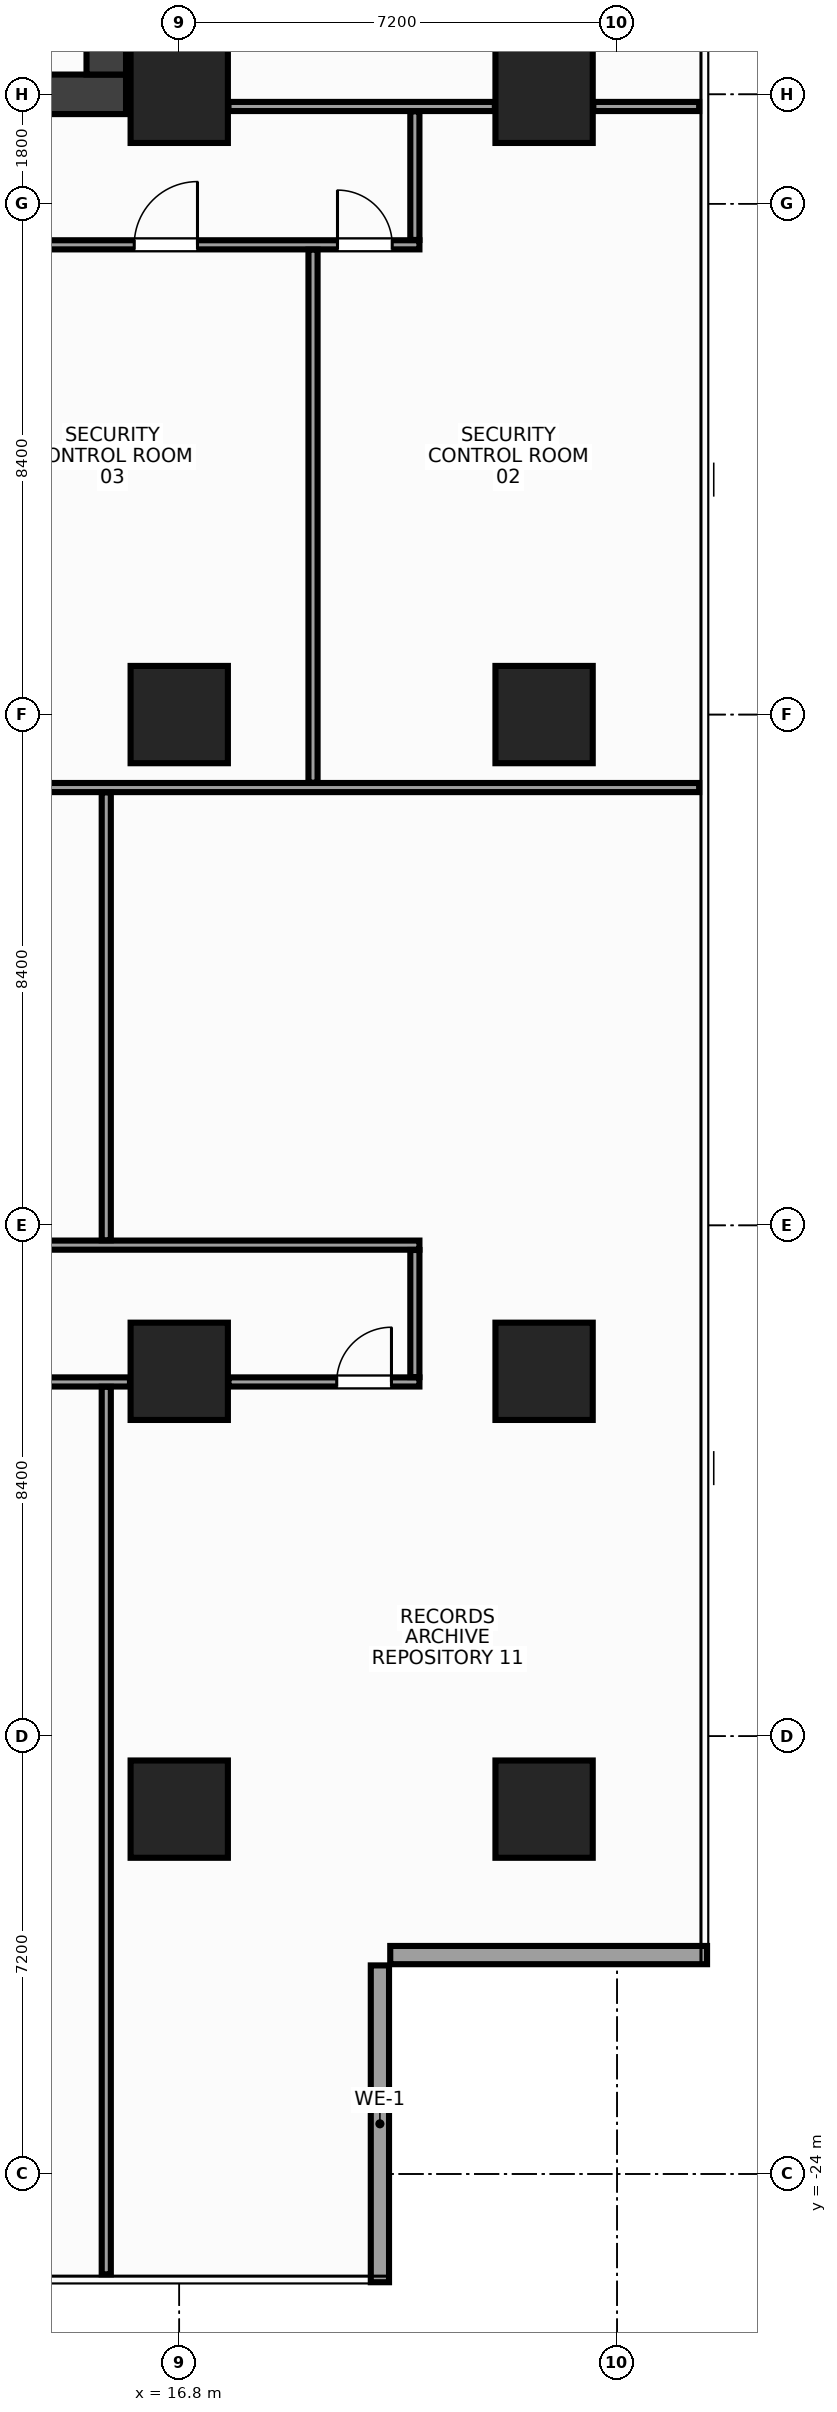
"""IFC4 building model, lengths in metres.
Left out: names, types, materials, properties, quantities, classifications, styles, units other than length and angle.
Written with IfcOpenShell. Run it as: python <this file> out.ifc"""

import sys

from ifc_helpers import new_model, si_unit, direction, frame, frame_2d, origin, origin_2d, place, context, subcontext, project, spatial, rectangle, extrude, source, transform, mapped, element, fill, save


model = new_model("IFC4")
c1 = context("Model", 3, precision=1e-05, world=origin(), true_north=direction((0.0, 1.0)))
c2 = subcontext(c1, "Body", "Model", "MODEL_VIEW")
j1 = project(units=[si_unit("LENGTHUNIT", "METRE"), si_unit("PLANEANGLEUNIT", "RADIAN")], contexts=[c1])
p1 = place(None, origin())
s1 = spatial("IfcSite", under=j1, at=p1, CompositionType="ELEMENT")
p2 = place(p1, origin())
s2 = spatial("IfcBuilding", under=s1, at=p2, CompositionType="ELEMENT")
p3 = place(p2, frame((0.0, 0.0, 92.0)))
s3 = spatial("IfcBuildingStorey", under=s2, at=p3, CompositionType="ELEMENT", Elevation=92.0)
m1 = source(origin(), c2, "Body", "SweptSolid", [
    extrude(rectangle(XDim=31.85, YDim=0.65, at=frame_2d((15.925, 0.0))), origin(), (0.0, 0.0, 1.0), 3.6),
])
p4 = place(p3, frame((-15.925, 10.2, 0.0), z_axis=(0.0, 0.0, 1.0), x_axis=(1.0, 0.0, 0.0)))
e1 = element("IfcWall", 1, at=p4, inside=s3, PredefinedType="SHEAR", context=c2, shape_type="MappedRepresentation", body=[
    mapped(m1, transform((0.0, 0.0, 0.0), x_axis=(1.0, 0.0, 0.0), y_axis=(0.0, 1.0, 0.0), z_axis=(0.0, 0.0, 1.0), scale=1.0)),
])
p5 = place(p4, frame((1.775, 0.0, 0.0)))
e2 = element("IfcOpeningElement", 2, at=p5, cuts=e1, PredefinedType="OPENING", context=c2, shape_type="SweptSolid", body=[
    extrude(rectangle(XDim=1.6, YDim=2.15, at=frame_2d((0.8, 1.075))), frame((0.0, 0.337, 0.0), z_axis=(0.0, -1.0, 0.0), x_axis=(1.0, 0.0, 0.0)), (0.0, 0.0, 1.0), 0.674),
])
p6 = place(p4, frame((28.475, 0.0, 0.0)))
e3 = element("IfcOpeningElement", 3, at=p6, cuts=e1, PredefinedType="OPENING", context=c2, shape_type="SweptSolid", body=[
    extrude(rectangle(XDim=1.6, YDim=2.15, at=frame_2d((0.8, 1.075))), frame((0.0, 0.337, 0.0), z_axis=(0.0, -1.0, 0.0), x_axis=(1.0, 0.0, 0.0)), (0.0, 0.0, 1.0), 0.674),
])
p7 = place(p4, frame((15.175, 0.0, 0.0)))
e4 = element("IfcOpeningElement", 4, at=p7, cuts=e1, PredefinedType="OPENING", context=c2, shape_type="SweptSolid", body=[
    extrude(rectangle(XDim=1.5, YDim=2.2, at=frame_2d((0.75, 1.1))), frame((0.0, 0.337, 0.0), z_axis=(0.0, -1.0, 0.0), x_axis=(1.0, 0.0, 0.0)), (0.0, 0.0, 1.0), 0.674),
])
m2 = source(origin(), c2, "Body", "SweptSolid", [
    extrude(rectangle(XDim=12.95, YDim=0.65, at=frame_2d((6.475, 0.0))), origin(), (0.0, 0.0, 1.0), 3.6),
])
p8 = place(p3, frame((15.6, 10.525, 0.0), z_axis=(0.0, 0.0, 1.0), x_axis=(0.0, 1.0, 0.0)))
e5 = element("IfcWall", 5, at=p8, inside=s3, PredefinedType="SHEAR", context=c2, shape_type="MappedRepresentation", body=[
    mapped(m2, transform((0.0, 0.0, 0.0), x_axis=(1.0, 0.0, 0.0), y_axis=(0.0, 1.0, 0.0), z_axis=(0.0, 0.0, 1.0), scale=1.0)),
])
m3 = source(origin(), c2, "Body", "SweptSolid", [
    extrude(rectangle(XDim=1.6, YDim=1.6, at=origin_2d()), origin(), (0.0, 0.0, 1.0), 3.6),
])
for number, where, z_axis, x_axis in (
    (6, (16.8, -18.0, 0.0), (0.0, 0.0, 1.0), (1.0, 0.0, 0.0)),
    (7, (16.8, -10.8, 0.0), (0.0, 0.0, 1.0), (1.0, 0.0, 0.0)),
    (8, (16.8, 0.0, 0.0), (0.0, 0.0, 1.0), (1.0, 0.0, 0.0)),
    (9, (16.8, 10.2, 0.0), (0.0, 0.0, 1.0), (1.0, 0.0, 0.0)),
    (10, (22.8, -18.0, 0.0), (0.0, 0.0, 1.0), (1.0, 0.0, 0.0)),
    (11, (22.8, -10.8, 0.0), (0.0, 0.0, 1.0), (1.0, 0.0, 0.0)),
    (12, (22.8, 0.0, 0.0), (0.0, 0.0, 1.0), (1.0, 0.0, 0.0)),
    (13, (22.8, 10.2, 0.0), (0.0, 0.0, 1.0), (1.0, 0.0, 0.0)),
):
    element("IfcColumn", number, at=place(p3, frame(where, z_axis=z_axis, x_axis=x_axis)), inside=s3, PredefinedType="COLUMN", context=c2, shape_type="MappedRepresentation", body=[
        mapped(m3, transform((0.0, 0.0, 0.0), x_axis=(1.0, 0.0, 0.0), y_axis=(0.0, 1.0, 0.0), z_axis=(0.0, 0.0, 1.0), scale=1.0)),
    ])
m4 = source(origin(), c2, "Body", "SweptSolid", [
    extrude(rectangle(XDim=5.21, YDim=0.3, at=frame_2d((2.605, 0.0))), origin(), (0.0, 0.0, 1.0), 2.74),
])
for number, where, z_axis, x_axis in (
    (14, (20.1, -25.78, 0.0), (0.0, 0.0, 1.0), (0.0, 1.0, 0.0)),
    (15, (20.27, -20.4, 0.0), (0.0, 0.0, 1.0), (1.0, 0.0, 0.0)),
):
    element("IfcWall", number, at=place(p3, frame(where, z_axis=z_axis, x_axis=x_axis)), inside=s3, PredefinedType="STANDARD", context=c2, shape_type="MappedRepresentation", body=[
        mapped(m4, transform((0.0, 0.0, 0.0), x_axis=(1.0, 0.0, 0.0), y_axis=(0.0, 1.0, 0.0), z_axis=(0.0, 0.0, 1.0), scale=1.0)),
    ])
m5 = source(origin(), c2, "Body", "SweptSolid", [
    extrude(rectangle(XDim=4.38, YDim=0.15, at=frame_2d((2.19, 0.0))), origin(), (0.0, 0.0, 1.0), 2.745),
])
p9 = place(p3, frame((17.61, 10.0, 0.0), z_axis=(0.0, 0.0, 1.0), x_axis=(1.0, 0.0, 0.0)))
e16 = element("IfcWall", 16, at=p9, inside=s3, PredefinedType="PARTITIONING", context=c2, shape_type="MappedRepresentation", body=[
    mapped(m5, transform((0.0, 0.0, 0.0), x_axis=(1.0, 0.0, 0.0), y_axis=(0.0, 1.0, 0.0), z_axis=(0.0, 0.0, 1.0), scale=1.0)),
])
m6 = source(origin(), c2, "Body", "SweptSolid", [
    extrude(rectangle(XDim=1.74, YDim=0.15, at=frame_2d((0.87, 0.0))), origin(), (0.0, 0.0, 1.0), 3.36),
])
p10 = place(p3, frame((23.61, 10.0, 0.0), z_axis=(0.0, 0.0, 1.0), x_axis=(1.0, 0.0, 0.0)))
e17 = element("IfcWall", 17, at=p10, inside=s3, PredefinedType="PARTITIONING", context=c2, shape_type="MappedRepresentation", body=[
    mapped(m6, transform((0.0, 0.0, 0.0), x_axis=(1.0, 0.0, 0.0), y_axis=(0.0, 1.0, 0.0), z_axis=(0.0, 0.0, 1.0), scale=1.0)),
])
m7 = source(origin(), c2, "Body", "SweptSolid", [
    extrude(rectangle(XDim=22.3, YDim=0.15, at=frame_2d((11.15, 0.0))), origin(), (0.0, 0.0, 1.0), 2.745),
])
p11 = place(p3, frame((-1.55, 7.725, 0.0), z_axis=(0.0, 0.0, 1.0), x_axis=(1.0, 0.0, 0.0)))
e18 = element("IfcWall", 18, at=p11, inside=s3, PredefinedType="PARTITIONING", context=c2, shape_type="MappedRepresentation", body=[
    mapped(m7, transform((0.0, 0.0, 0.0), x_axis=(1.0, 0.0, 0.0), y_axis=(0.0, 1.0, 0.0), z_axis=(0.0, 0.0, 1.0), scale=1.0)),
])
p12 = place(p11, frame((20.952, 0.0, 0.0)))
e19 = element("IfcOpeningElement", 19, at=p12, cuts=e18, PredefinedType="OPENING", context=c2, shape_type="SweptSolid", body=[
    extrude(rectangle(XDim=0.9, YDim=2.15, at=frame_2d((0.45, 1.075))), frame((0.0, 0.087, 0.0), z_axis=(0.0, -1.0, 0.0), x_axis=(1.0, 0.0, 0.0)), (0.0, 0.0, 1.0), 0.174),
])
p13 = place(p11, frame((17.61, 0.0, 0.0)))
e20 = element("IfcOpeningElement", 20, at=p13, cuts=e18, PredefinedType="OPENING", context=c2, shape_type="SweptSolid", body=[
    extrude(rectangle(XDim=1.04, YDim=2.2, at=frame_2d((0.52, 1.1))), frame((0.0, 0.087, 0.0), z_axis=(0.0, -1.0, 0.0), x_axis=(1.0, 0.0, 0.0)), (0.0, 0.0, 1.0), 0.174),
])
p14 = place(p11, frame((2.677, 0.0, 0.0)))
e21 = element("IfcOpeningElement", 21, at=p14, cuts=e18, PredefinedType="OPENING", context=c2, shape_type="SweptSolid", body=[
    extrude(rectangle(XDim=1.04, YDim=2.2, at=frame_2d((0.52, 1.1))), frame((0.0, 0.087, 0.0), z_axis=(0.0, -1.0, 0.0), x_axis=(1.0, 0.0, 0.0)), (0.0, 0.0, 1.0), 0.174),
])
p15 = place(p11, frame((9.63, 0.0, 0.0)))
e22 = element("IfcOpeningElement", 22, at=p15, cuts=e18, PredefinedType="OPENING", context=c2, shape_type="SweptSolid", body=[
    extrude(rectangle(XDim=1.04, YDim=2.2, at=frame_2d((0.52, 1.1))), frame((0.0, 0.087, 0.0), z_axis=(0.0, -1.0, 0.0), x_axis=(1.0, 0.0, 0.0)), (0.0, 0.0, 1.0), 0.174),
])
p16 = place(p3, frame((-1.55, -8.725, 0.0), z_axis=(0.0, 0.0, 1.0), x_axis=(1.0, 0.0, 0.0)))
e23 = element("IfcWall", 23, at=p16, inside=s3, PredefinedType="PARTITIONING", context=c2, shape_type="MappedRepresentation", body=[
    mapped(m7, transform((0.0, 0.0, 0.0), x_axis=(1.0, 0.0, 0.0), y_axis=(0.0, 1.0, 0.0), z_axis=(0.0, 0.0, 1.0), scale=1.0)),
])
p17 = place(p16, frame((1.897, 0.0, 0.0)))
e24 = element("IfcOpeningElement", 24, at=p17, cuts=e23, PredefinedType="OPENING", context=c2, shape_type="SweptSolid", body=[
    extrude(rectangle(XDim=1.04, YDim=2.2, at=frame_2d((0.52, 1.1))), frame((0.0, 0.087, 0.0), z_axis=(0.0, -1.0, 0.0), x_axis=(1.0, 0.0, 0.0)), (0.0, 0.0, 1.0), 0.174),
])
p18 = place(p16, frame((10.23, 0.0, 0.0)))
e25 = element("IfcOpeningElement", 25, at=p18, cuts=e23, PredefinedType="OPENING", context=c2, shape_type="SweptSolid", body=[
    extrude(rectangle(XDim=1.04, YDim=2.2, at=frame_2d((0.52, 1.1))), frame((0.0, 0.087, 0.0), z_axis=(0.0, -1.0, 0.0), x_axis=(1.0, 0.0, 0.0)), (0.0, 0.0, 1.0), 0.174),
])
m8 = source(origin(), c2, "Body", "SweptSolid", [
    extrude(rectangle(XDim=7.08, YDim=0.15, at=frame_2d((3.54, 0.0))), origin(), (0.0, 0.0, 1.0), 2.745),
])
p19 = place(p3, frame((8.91, -10.975, 0.0), z_axis=(0.0, 0.0, 1.0), x_axis=(1.0, 0.0, 0.0)))
e26 = element("IfcWall", 26, at=p19, inside=s3, PredefinedType="PARTITIONING", context=c2, shape_type="MappedRepresentation", body=[
    mapped(m8, transform((0.0, 0.0, 0.0), x_axis=(1.0, 0.0, 0.0), y_axis=(0.0, 1.0, 0.0), z_axis=(0.0, 0.0, 1.0), scale=1.0)),
])
m9 = source(origin(), c2, "Body", "SweptSolid", [
    extrude(rectangle(XDim=3.14, YDim=0.15, at=frame_2d((1.57, 0.0))), origin(), (0.0, 0.0, 1.0), 2.745),
])
p20 = place(p3, frame((17.61, -10.975, 0.0), z_axis=(0.0, 0.0, 1.0), x_axis=(1.0, 0.0, 0.0)))
e27 = element("IfcWall", 27, at=p20, inside=s3, PredefinedType="PARTITIONING", context=c2, shape_type="MappedRepresentation", body=[
    mapped(m9, transform((0.0, 0.0, 0.0), x_axis=(1.0, 0.0, 0.0), y_axis=(0.0, 1.0, 0.0), z_axis=(0.0, 0.0, 1.0), scale=1.0)),
])
p21 = place(p20, frame((1.78, 0.0, 0.0)))
e28 = element("IfcOpeningElement", 28, at=p21, cuts=e27, PredefinedType="OPENING", context=c2, shape_type="SweptSolid", body=[
    extrude(rectangle(XDim=0.9, YDim=2.15, at=frame_2d((0.45, 1.075))), frame((0.0, 0.087, 0.0), z_axis=(0.0, -1.0, 0.0), x_axis=(1.0, 0.0, 0.0)), (0.0, 0.0, 1.0), 0.174),
])
m10 = source(origin(), c2, "Body", "SweptSolid", [
    extrude(rectangle(XDim=2.115, YDim=0.15, at=frame_2d((1.058, 0.0))), origin(), (0.0, 0.0, 1.0), 3.36),
])
p22 = place(p3, frame((20.675, 7.805, 0.0), z_axis=(0.0, 0.0, 1.0), x_axis=(0.0, 1.0, 0.0)))
e29 = element("IfcWall", 29, at=p22, inside=s3, PredefinedType="PARTITIONING", context=c2, shape_type="MappedRepresentation", body=[
    mapped(m10, transform((0.0, 0.0, 0.0), x_axis=(1.0, 0.0, 0.0), y_axis=(0.0, 1.0, 0.0), z_axis=(0.0, 0.0, 1.0), scale=1.0)),
])
m11 = source(origin(), c2, "Body", "SweptSolid", [
    extrude(rectangle(XDim=2.09, YDim=0.15, at=frame_2d((1.045, 0.0))), origin(), (0.0, 0.0, 1.0), 3.36),
])
p23 = place(p3, frame((20.675, -10.895, 0.0), z_axis=(0.0, 0.0, 1.0), x_axis=(0.0, 1.0, 0.0)))
e30 = element("IfcWall", 30, at=p23, inside=s3, PredefinedType="PARTITIONING", context=c2, shape_type="MappedRepresentation", body=[
    mapped(m11, transform((0.0, 0.0, 0.0), x_axis=(1.0, 0.0, 0.0), y_axis=(0.0, 1.0, 0.0), z_axis=(0.0, 0.0, 1.0), scale=1.0)),
])
m12 = source(origin(), c2, "Body", "SweptSolid", [
    extrude(rectangle(XDim=26.895, YDim=0.15, at=frame_2d((13.448, 0.0))), origin(), (0.0, 0.0, 1.0), 2.745),
])
p24 = place(p3, frame((-1.545, -1.2, 0.0), z_axis=(0.0, 0.0, 1.0), x_axis=(1.0, 0.0, 0.0)))
e31 = element("IfcWall", 31, at=p24, inside=s3, PredefinedType="PARTITIONING", context=c2, shape_type="MappedRepresentation", body=[
    mapped(m12, transform((0.0, 0.0, 0.0), x_axis=(1.0, 0.0, 0.0), y_axis=(0.0, 1.0, 0.0), z_axis=(0.0, 0.0, 1.0), scale=1.0)),
])
m13 = source(origin(), c2, "Body", "SweptSolid", [
    extrude(rectangle(XDim=8.765, YDim=0.15, at=frame_2d((4.383, 0.0))), origin(), (0.0, 0.0, 1.0), 2.745),
])
p25 = place(p3, frame((19.0, -1.12, 0.0), z_axis=(0.0, 0.0, 1.0), x_axis=(0.0, 1.0, 0.0)))
e32 = element("IfcWall", 32, at=p25, inside=s3, PredefinedType="PARTITIONING", context=c2, shape_type="MappedRepresentation", body=[
    mapped(m13, transform((0.0, 0.0, 0.0), x_axis=(1.0, 0.0, 0.0), y_axis=(0.0, 1.0, 0.0), z_axis=(0.0, 0.0, 1.0), scale=1.0)),
])
m14 = source(origin(), c2, "Body", "SweptSolid", [
    extrude(rectangle(XDim=14.595, YDim=0.15, at=frame_2d((7.297, 0.0))), origin(), (0.0, 0.0, 1.0), 2.745),
])
p26 = place(p3, frame((15.6, -25.65, 0.0), z_axis=(0.0, 0.0, 1.0), x_axis=(0.0, 1.0, 0.0)))
e33 = element("IfcWall", 33, at=p26, inside=s3, PredefinedType="PARTITIONING", context=c2, shape_type="MappedRepresentation", body=[
    mapped(m14, transform((0.0, 0.0, 0.0), x_axis=(1.0, 0.0, 0.0), y_axis=(0.0, 1.0, 0.0), z_axis=(0.0, 0.0, 1.0), scale=1.0)),
])
m15 = source(origin(), c2, "Body", "SweptSolid", [
    extrude(rectangle(XDim=7.365, YDim=0.15, at=frame_2d((3.683, 0.0))), origin(), (0.0, 0.0, 1.0), 3.36),
])
p27 = place(p3, frame((15.6, -8.645, 0.0), z_axis=(0.0, 0.0, 1.0), x_axis=(0.0, 1.0, 0.0)))
e34 = element("IfcWall", 34, at=p27, inside=s3, PredefinedType="PARTITIONING", context=c2, shape_type="MappedRepresentation", body=[
    mapped(m15, transform((0.0, 0.0, 0.0), x_axis=(1.0, 0.0, 0.0), y_axis=(0.0, 1.0, 0.0), z_axis=(0.0, 0.0, 1.0), scale=1.0)),
])
m16 = source(origin(), c2, "Body", "SweptSolid", [
    extrude(rectangle(XDim=0.9, YDim=2.15, at=frame_2d((0.45, 1.075))), frame((0.0, 0.025, 0.0), z_axis=(0.0, -1.0, 0.0), x_axis=(1.0, 0.0, 0.0)), (0.0, 0.0, 1.0), 0.05),
])
p28 = place(p12, origin())
e35 = element("IfcDoor", 35, at=p28, inside=s3, OperationType="SINGLE_SWING_LEFT", PredefinedType="DOOR", context=c2, shape_type="MappedRepresentation", body=[
    mapped(m16, transform((0.0, 0.0, 0.0), x_axis=(1.0, 0.0, 0.0), y_axis=(0.0, 1.0, 0.0), z_axis=(0.0, 0.0, 1.0), scale=1.0)),
])
fill(e19, e35)
m17 = source(origin(), c2, "Body", "SweptSolid", [
    extrude(rectangle(XDim=1.04, YDim=2.2, at=frame_2d((0.52, 1.1))), frame((0.0, 0.025, 0.0), z_axis=(0.0, -1.0, 0.0), x_axis=(1.0, 0.0, 0.0)), (0.0, 0.0, 1.0), 0.05),
])
p29 = place(p13, origin())
e36 = element("IfcDoor", 36, at=p29, inside=s3, OperationType="SINGLE_SWING_RIGHT", PredefinedType="DOOR", context=c2, shape_type="MappedRepresentation", body=[
    mapped(m17, transform((0.0, 0.0, 0.0), x_axis=(1.0, 0.0, 0.0), y_axis=(0.0, 1.0, 0.0), z_axis=(0.0, 0.0, 1.0), scale=1.0)),
])
fill(e20, e36)
p30 = place(p21, origin())
e37 = element("IfcDoor", 37, at=p30, inside=s3, OperationType="SINGLE_SWING_RIGHT", PredefinedType="DOOR", context=c2, shape_type="MappedRepresentation", body=[
    mapped(m16, transform((0.0, 0.0, 0.0), x_axis=(1.0, 0.0, 0.0), y_axis=(0.0, 1.0, 0.0), z_axis=(0.0, 0.0, 1.0), scale=1.0)),
])
fill(e28, e37)
save(model, sys.argv[1])
